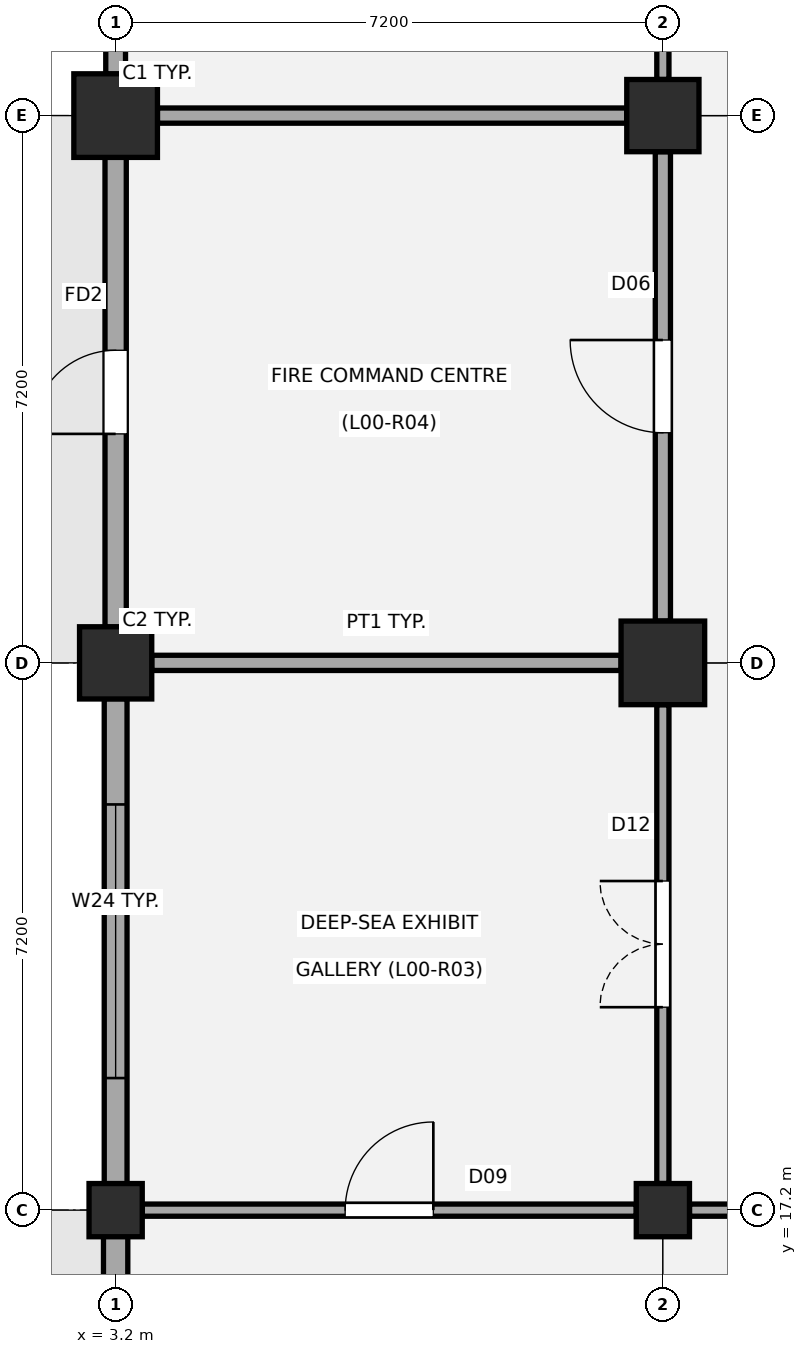
"""IFC4 building model, lengths in metres.
Left out: names, types, materials, properties, quantities, classifications, styles, units other than length and angle.
Written with IfcOpenShell. Run it as: python <this file> out.ifc"""

import sys

from ifc_helpers import new_model, si_unit, direction, frame, frame_2d, origin, origin_2d, place, context, subcontext, project, spatial, rectangle, extrude, element, fill, save


model = new_model("IFC4")
c1 = context("Model", 3, precision=1e-05, world=origin(), true_north=direction((0.0, 1.0)))
c2 = subcontext(c1, "Body", "Model", "MODEL_VIEW")
j1 = project(units=[si_unit("LENGTHUNIT", "METRE"), si_unit("PLANEANGLEUNIT", "RADIAN")], contexts=[c1])
p1 = place(None, origin())
s1 = spatial("IfcSite", under=j1, at=p1, CompositionType="ELEMENT")
p2 = place(p1, origin())
s2 = spatial("IfcBuilding", under=s1, at=p2, CompositionType="ELEMENT")
p3 = place(p2, origin())
s3 = spatial("IfcBuildingStorey", under=s2, at=p3, CompositionType="ELEMENT", Elevation=0.0)
p4 = place(p3, frame((3.2, 17.2, -0.35), z_axis=(0.0, 0.0, 1.0), x_axis=(1.0, 0.0, 0.0)))
e1 = element("IfcColumn", 1, at=p4, inside=s3, PredefinedType="COLUMN", context=c2, shape_type="SweptSolid", body=[
    extrude(rectangle(XDim=0.7, YDim=0.7, at=origin_2d()), origin(), (0.0, 0.0, 1.0), 5.03),
])
p5 = place(p3, frame((3.2, 24.4, -0.35), z_axis=(0.0, 0.0, 1.0), x_axis=(1.0, 0.0, 0.0)))
e2 = element("IfcColumn", 2, at=p5, inside=s3, PredefinedType="COLUMN", context=c2, shape_type="SweptSolid", body=[
    extrude(rectangle(XDim=0.95, YDim=0.95, at=origin_2d()), origin(), (0.0, 0.0, 1.0), 5.03),
])
p6 = place(p3, frame((3.2, 31.6, -0.35), z_axis=(0.0, 0.0, 1.0), x_axis=(1.0, 0.0, 0.0)))
e3 = element("IfcColumn", 3, at=p6, inside=s3, PredefinedType="COLUMN", context=c2, shape_type="SweptSolid", body=[
    extrude(rectangle(XDim=1.1, YDim=1.1, at=origin_2d()), origin(), (0.0, 0.0, 1.0), 5.03),
])
p7 = place(p3, frame((10.4, 17.2, -0.35), z_axis=(0.0, 0.0, 1.0), x_axis=(1.0, 0.0, 0.0)))
e4 = element("IfcColumn", 4, at=p7, inside=s3, PredefinedType="COLUMN", context=c2, shape_type="SweptSolid", body=[
    extrude(rectangle(XDim=0.7, YDim=0.7, at=origin_2d()), origin(), (0.0, 0.0, 1.0), 5.03),
])
p8 = place(p3, frame((10.4, 24.4, -0.35), z_axis=(0.0, 0.0, 1.0), x_axis=(1.0, 0.0, 0.0)))
e5 = element("IfcColumn", 5, at=p8, inside=s3, PredefinedType="COLUMN", context=c2, shape_type="SweptSolid", body=[
    extrude(rectangle(XDim=1.1, YDim=1.1, at=origin_2d()), origin(), (0.0, 0.0, 1.0), 5.03),
])
p9 = place(p3, frame((10.4, 31.6, -0.35), z_axis=(0.0, 0.0, 1.0), x_axis=(1.0, 0.0, 0.0)))
e6 = element("IfcColumn", 6, at=p9, inside=s3, PredefinedType="COLUMN", context=c2, shape_type="SweptSolid", body=[
    extrude(rectangle(XDim=0.95, YDim=0.95, at=origin_2d()), origin(), (0.0, 0.0, 1.0), 5.03),
])
p10 = place(p3, frame((3.2, 10.345, 0.0), z_axis=(0.0, 0.0, 1.0), x_axis=(0.0, 1.0, 0.0)))
e7 = element("IfcWall", 7, at=p10, inside=s3, PredefinedType="STANDARD", context=c2, shape_type="SweptSolid", body=[
    extrude(rectangle(XDim=6.51, YDim=0.32, at=frame_2d((3.255, 0.0))), origin(), (0.0, 0.0, 1.0), 3.67),
])
p11 = place(p10, frame((2.065, 0.0, 0.0)))
e8 = element("IfcOpeningElement", 8, at=p11, cuts=e7, PredefinedType="OPENING", context=c2, shape_type="SweptSolid", body=[
    extrude(rectangle(XDim=2.38, YDim=2.42, at=frame_2d((1.19, 1.21))), frame((0.0, 0.17, 0.0), z_axis=(0.0, -1.0, 0.0), x_axis=(1.0, 0.0, 0.0)), (0.0, 0.0, 1.0), 0.34),
])
p12 = place(p3, frame((3.2, 17.545, 0.0), z_axis=(0.0, 0.0, 1.0), x_axis=(0.0, 1.0, 0.0)))
e9 = element("IfcWall", 9, at=p12, inside=s3, PredefinedType="STANDARD", context=c2, shape_type="SweptSolid", body=[
    extrude(rectangle(XDim=6.385, YDim=0.3, at=frame_2d((3.192, 0.0))), origin(), (0.0, 0.0, 1.0), 3.67),
])
p13 = place(p12, frame((1.393, 0.0, 0.95)))
e10 = element("IfcOpeningElement", 10, at=p13, cuts=e9, PredefinedType="OPENING", context=c2, shape_type="SweptSolid", body=[
    extrude(rectangle(XDim=3.6, YDim=2.05, at=frame_2d((1.8, 1.025))), frame((0.0, 0.16, 0.0), z_axis=(0.0, -1.0, 0.0), x_axis=(1.0, 0.0, 0.0)), (0.0, 0.0, 1.0), 0.32),
])
p14 = place(p3, frame((3.2, 24.87, 0.0), z_axis=(0.0, 0.0, 1.0), x_axis=(0.0, 1.0, 0.0)))
e11 = element("IfcWall", 11, at=p14, inside=s3, PredefinedType="STANDARD", context=c2, shape_type="SweptSolid", body=[
    extrude(rectangle(XDim=6.185, YDim=0.28, at=frame_2d((3.092, 0.0))), origin(), (0.0, 0.0, 1.0), 3.67),
])
p15 = place(p14, frame((2.542, 0.0, 0.0)))
e12 = element("IfcOpeningElement", 12, at=p15, cuts=e11, PredefinedType="OPENING", context=c2, shape_type="SweptSolid", body=[
    extrude(rectangle(XDim=1.1, YDim=2.15, at=frame_2d((0.55, 1.075))), frame((0.0, 0.15, 0.0), z_axis=(0.0, -1.0, 0.0), x_axis=(1.0, 0.0, 0.0)), (0.0, 0.0, 1.0), 0.3),
])
p16 = place(p3, frame((3.2, 32.145, 0.0), z_axis=(0.0, 0.0, 1.0), x_axis=(0.0, 1.0, 0.0)))
e13 = element("IfcWall", 13, at=p16, inside=s3, PredefinedType="STANDARD", context=c2, shape_type="SweptSolid", body=[
    extrude(rectangle(XDim=6.185, YDim=0.26, at=frame_2d((3.093, 0.0))), origin(), (0.0, 0.0, 1.0), 3.67),
])
p17 = place(p16, frame((2.518, 0.0, 0.95)))
e14 = element("IfcOpeningElement", 14, at=p17, cuts=e13, PredefinedType="OPENING", context=c2, shape_type="SweptSolid", body=[
    extrude(rectangle(XDim=1.15, YDim=1.15, at=frame_2d((0.575, 0.575))), frame((0.0, 0.14, 0.0), z_axis=(0.0, -1.0, 0.0), x_axis=(1.0, 0.0, 0.0)), (0.0, 0.0, 1.0), 0.28),
])
p18 = place(p3, frame((3.55, 17.2, 0.0), z_axis=(0.0, 0.0, 1.0), x_axis=(1.0, 0.0, 0.0)))
e15 = element("IfcWall", 15, at=p18, inside=s3, PredefinedType="PARTITIONING", context=c2, shape_type="SweptSolid", body=[
    extrude(rectangle(XDim=6.5, YDim=0.16, at=frame_2d((3.25, 0.0))), origin(), (0.0, 0.0, 1.0), 3.52),
])
p19 = place(p18, frame((2.67, 0.0, 0.0)))
e16 = element("IfcOpeningElement", 16, at=p19, cuts=e15, PredefinedType="OPENING", context=c2, shape_type="SweptSolid", body=[
    extrude(rectangle(XDim=1.16, YDim=2.18, at=frame_2d((0.58, 1.09))), frame((0.0, 0.09, 0.0), z_axis=(0.0, -1.0, 0.0), x_axis=(1.0, 0.0, 0.0)), (0.0, 0.0, 1.0), 0.18),
])
p20 = place(p3, frame((10.4, 17.55, 0.0), z_axis=(0.0, 0.0, 1.0), x_axis=(0.0, 1.0, 0.0)))
e17 = element("IfcWall", 17, at=p20, inside=s3, PredefinedType="PARTITIONING", context=c2, shape_type="SweptSolid", body=[
    extrude(rectangle(XDim=6.3, YDim=0.16, at=frame_2d((3.15, 0.0))), origin(), (0.0, 0.0, 1.0), 3.62),
])
p21 = place(p20, frame((2.32, 0.0, 0.0)))
e18 = element("IfcOpeningElement", 18, at=p21, cuts=e17, PredefinedType="OPENING", context=c2, shape_type="SweptSolid", body=[
    extrude(rectangle(XDim=1.66, YDim=2.22, at=frame_2d((0.83, 1.11))), frame((0.0, 0.09, 0.0), z_axis=(0.0, -1.0, 0.0), x_axis=(1.0, 0.0, 0.0)), (0.0, 0.0, 1.0), 0.18),
])
p22 = place(p3, frame((3.675, 24.4, 0.0), z_axis=(0.0, 0.0, 1.0), x_axis=(1.0, 0.0, 0.0)))
e19 = element("IfcWall", 19, at=p22, inside=s3, PredefinedType="PARTITIONING", context=c2, shape_type="SweptSolid", body=[
    extrude(rectangle(XDim=6.175, YDim=0.2, at=frame_2d((3.087, 0.0))), origin(), (0.0, 0.0, 1.0), 3.62),
])
p23 = place(p3, frame((10.4, 24.95, 0.0), z_axis=(0.0, 0.0, 1.0), x_axis=(0.0, 1.0, 0.0)))
e20 = element("IfcWall", 20, at=p23, inside=s3, PredefinedType="PARTITIONING", context=c2, shape_type="SweptSolid", body=[
    extrude(rectangle(XDim=6.175, YDim=0.2, at=frame_2d((3.087, 0.0))), origin(), (0.0, 0.0, 1.0), 3.62),
])
p24 = place(p23, frame((2.478, 0.0, 0.0)))
e21 = element("IfcOpeningElement", 21, at=p24, cuts=e20, PredefinedType="OPENING", context=c2, shape_type="SweptSolid", body=[
    extrude(rectangle(XDim=1.22, YDim=2.16, at=frame_2d((0.61, 1.08))), frame((0.0, 0.11, 0.0), z_axis=(0.0, -1.0, 0.0), x_axis=(1.0, 0.0, 0.0)), (0.0, 0.0, 1.0), 0.22),
])
p25 = place(p3, frame((3.75, 31.6, 0.0), z_axis=(0.0, 0.0, 1.0), x_axis=(1.0, 0.0, 0.0)))
e22 = element("IfcWall", 22, at=p25, inside=s3, PredefinedType="PARTITIONING", context=c2, shape_type="SweptSolid", body=[
    extrude(rectangle(XDim=6.175, YDim=0.2, at=frame_2d((3.087, 0.0))), origin(), (0.0, 0.0, 1.0), 3.52),
])
p26 = place(p3, frame((10.4, 32.075, 0.0), z_axis=(0.0, 0.0, 1.0), x_axis=(0.0, 1.0, 0.0)))
e23 = element("IfcWall", 23, at=p26, inside=s3, PredefinedType="PARTITIONING", context=c2, shape_type="SweptSolid", body=[
    extrude(rectangle(XDim=6.175, YDim=0.16, at=frame_2d((3.087, 0.0))), origin(), (0.0, 0.0, 1.0), 3.62),
])
p27 = place(p26, frame((2.508, 0.0, 0.0)))
e24 = element("IfcOpeningElement", 24, at=p27, cuts=e23, PredefinedType="OPENING", context=c2, shape_type="SweptSolid", body=[
    extrude(rectangle(XDim=1.16, YDim=2.18, at=frame_2d((0.58, 1.09))), frame((0.0, 0.09, 0.0), z_axis=(0.0, -1.0, 0.0), x_axis=(1.0, 0.0, 0.0)), (0.0, 0.0, 1.0), 0.18),
])
p28 = place(p3, frame((10.75, 17.2, 0.0), z_axis=(0.0, 0.0, 1.0), x_axis=(1.0, 0.0, 0.0)))
e25 = element("IfcWall", 25, at=p28, inside=s3, PredefinedType="PARTITIONING", context=c2, shape_type="SweptSolid", body=[
    extrude(rectangle(XDim=6.5, YDim=0.16, at=frame_2d((3.25, 0.0))), origin(), (0.0, 0.0, 1.0), 3.62),
])
p29 = place(p28, frame((2.32, 0.0, 0.0)))
e26 = element("IfcOpeningElement", 26, at=p29, cuts=e25, PredefinedType="OPENING", context=c2, shape_type="SweptSolid", body=[
    extrude(rectangle(XDim=1.86, YDim=2.26, at=frame_2d((0.93, 1.13))), frame((0.0, 0.09, 0.0), z_axis=(0.0, -1.0, 0.0), x_axis=(1.0, 0.0, 0.0)), (0.0, 0.0, 1.0), 0.18),
])
p30 = place(p13, origin())
e27 = element("IfcWindow", 27, at=p30, inside=s3, PartitioningType="SINGLE_PANEL", PredefinedType="WINDOW", context=c2, shape_type="SweptSolid", body=[
    extrude(rectangle(XDim=3.6, YDim=2.05, at=frame_2d((1.8, 1.025))), frame((0.0, 0.03, 0.0), z_axis=(0.0, -1.0, 0.0), x_axis=(1.0, 0.0, 0.0)), (0.0, 0.0, 1.0), 0.06),
])
fill(e10, e27)
p31 = place(p15, origin())
e28 = element("IfcDoor", 28, at=p31, inside=s3, OperationType="SINGLE_SWING_LEFT", PredefinedType="DOOR", context=c2, shape_type="SweptSolid", body=[
    extrude(rectangle(XDim=1.1, YDim=2.15, at=frame_2d((0.55, 1.075))), frame((0.0, 0.025, 0.0), z_axis=(0.0, -1.0, 0.0), x_axis=(1.0, 0.0, 0.0)), (0.0, 0.0, 1.0), 0.05),
])
fill(e12, e28)
p32 = place(p19, origin())
e29 = element("IfcDoor", 29, at=p32, inside=s3, OperationType="SINGLE_SWING_RIGHT", PredefinedType="DOOR", context=c2, shape_type="SweptSolid", body=[
    extrude(rectangle(XDim=1.16, YDim=2.18, at=frame_2d((0.58, 1.09))), frame((0.0, 0.025, 0.0), z_axis=(0.0, -1.0, 0.0), x_axis=(1.0, 0.0, 0.0)), (0.0, 0.0, 1.0), 0.05),
])
fill(e16, e29)
p33 = place(p21, origin())
e30 = element("IfcDoor", 30, at=p33, inside=s3, OperationType="DOUBLE_DOOR_SINGLE_SWING", PredefinedType="DOOR", context=c2, shape_type="SweptSolid", body=[
    extrude(rectangle(XDim=1.66, YDim=2.22, at=frame_2d((0.83, 1.11))), frame((0.0, 0.025, 0.0), z_axis=(0.0, -1.0, 0.0), x_axis=(1.0, 0.0, 0.0)), (0.0, 0.0, 1.0), 0.05),
])
fill(e18, e30)
p34 = place(p24, origin())
e31 = element("IfcDoor", 31, at=p34, inside=s3, OperationType="SINGLE_SWING_RIGHT", PredefinedType="DOOR", context=c2, shape_type="SweptSolid", body=[
    extrude(rectangle(XDim=1.22, YDim=2.16, at=frame_2d((0.61, 1.08))), frame((0.0, 0.025, 0.0), z_axis=(0.0, -1.0, 0.0), x_axis=(1.0, 0.0, 0.0)), (0.0, 0.0, 1.0), 0.05),
])
fill(e21, e31)
save(model, sys.argv[1])
